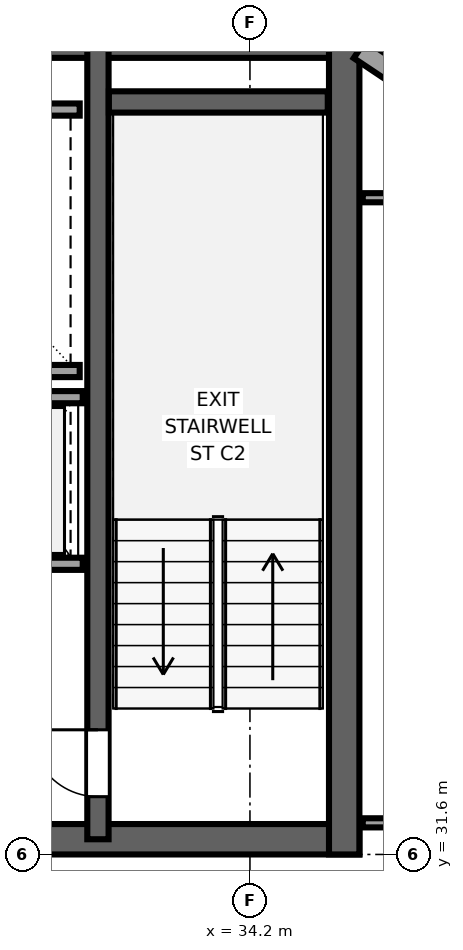
"""IFC4 building model, lengths in metres.
Left out: names, types, materials, properties, quantities, classifications, styles, units other than length and angle.
Written with IfcOpenShell. Run it as: python <this file> out.ifc"""

import sys

from ifc_helpers import new_model, si_unit, direction, frame, frame_2d, origin, place, context, subcontext, project, spatial, rectangle, extrude, source, transform, mapped, element, fill, save


model = new_model("IFC4")
c1 = context("Model", 3, precision=1e-05, world=origin(), true_north=direction((0.0, 1.0)))
c2 = subcontext(c1, "Body", "Model", "MODEL_VIEW")
j1 = project(units=[si_unit("LENGTHUNIT", "METRE"), si_unit("PLANEANGLEUNIT", "RADIAN")], contexts=[c1])
p1 = place(None, origin())
s1 = spatial("IfcSite", under=j1, at=p1, CompositionType="ELEMENT")
p2 = place(p1, origin())
s2 = spatial("IfcBuilding", under=s1, at=p2, CompositionType="ELEMENT")
p3 = place(p2, frame((0.0, 0.0, 245.2)))
s3 = spatial("IfcBuildingStorey", under=s2, at=p3, CompositionType="ELEMENT", Elevation=245.2)
p4 = place(p3, frame((10.0, 31.85, 0.0), z_axis=(0.0, 0.0, 1.0), x_axis=(1.0, 0.0, 0.0)))
e1 = element("IfcWall", 1, at=p4, inside=s3, PredefinedType="SHEAR", context=c2, shape_type="SweptSolid", body=[
    extrude(rectangle(XDim=26.0, YDim=0.5, at=frame_2d((13.0, 0.0))), origin(), (0.0, 0.0, 1.0), 3.55),
])
p5 = place(p4, frame((7.45, 0.0, 0.0), z_axis=(0.0, 0.0, 1.0), x_axis=(-1.0, 0.0, 0.0)))
e2 = element("IfcOpeningElement", 2, at=p5, cuts=e1, PredefinedType="OPENING", context=c2, shape_type="SweptSolid", body=[
    extrude(rectangle(XDim=1.5, YDim=2.04, at=frame_2d((0.75, 1.02))), frame((0.0, 0.26, 0.0), z_axis=(0.0, -1.0, 0.0), x_axis=(1.0, 0.0, 0.0)), (0.0, 0.0, 1.0), 0.52),
])
p6 = place(p4, frame((13.75, 0.0, 0.0), z_axis=(0.0, 0.0, 1.0), x_axis=(-1.0, 0.0, 0.0)))
e3 = element("IfcOpeningElement", 3, at=p6, cuts=e1, PredefinedType="OPENING", context=c2, shape_type="SweptSolid", body=[
    extrude(rectangle(XDim=1.5, YDim=2.04, at=frame_2d((0.75, 1.02))), frame((0.0, 0.26, 0.0), z_axis=(0.0, -1.0, 0.0), x_axis=(1.0, 0.0, 0.0)), (0.0, 0.0, 1.0), 0.52),
])
p7 = place(p4, frame((20.05, 0.0, 0.0), z_axis=(0.0, 0.0, 1.0), x_axis=(-1.0, 0.0, 0.0)))
e4 = element("IfcOpeningElement", 4, at=p7, cuts=e1, PredefinedType="OPENING", context=c2, shape_type="SweptSolid", body=[
    extrude(rectangle(XDim=1.5, YDim=2.04, at=frame_2d((0.75, 1.02))), frame((0.0, 0.26, 0.0), z_axis=(0.0, -1.0, 0.0), x_axis=(1.0, 0.0, 0.0)), (0.0, 0.0, 1.0), 0.52),
])
p8 = place(p3, frame((10.0, 44.95, 0.0), z_axis=(0.0, 0.0, 1.0), x_axis=(1.0, 0.0, 0.0)))
e5 = element("IfcWall", 5, at=p8, inside=s3, PredefinedType="SHEAR", context=c2, shape_type="SweptSolid", body=[
    extrude(rectangle(XDim=26.0, YDim=0.5, at=frame_2d((13.0, 0.0))), origin(), (0.0, 0.0, 1.0), 3.55),
])
p9 = place(p3, frame((35.75, 31.6, 0.0), z_axis=(0.0, 0.0, 1.0), x_axis=(0.0, 1.0, 0.0)))
e6 = element("IfcWall", 6, at=p9, inside=s3, PredefinedType="SHEAR", context=c2, shape_type="SweptSolid", body=[
    extrude(rectangle(XDim=13.6, YDim=0.5, at=frame_2d((6.8, 0.0))), origin(), (0.0, 0.0, 1.0), 3.55),
])
p10 = place(p3, frame((31.7, 31.85, 0.0), z_axis=(0.0, 0.0, 1.0), x_axis=(0.0, 1.0, 0.0)))
e7 = element("IfcWall", 7, at=p10, inside=s3, PredefinedType="SHEAR", context=c2, shape_type="SweptSolid", body=[
    extrude(rectangle(XDim=13.1, YDim=0.35, at=frame_2d((6.55, 0.0))), origin(), (0.0, 0.0, 1.0), 3.55),
])
p11 = place(p10, frame((1.8, 0.0, 0.0), z_axis=(0.0, 0.0, 1.0), x_axis=(-1.0, 0.0, 0.0)))
e8 = element("IfcOpeningElement", 8, at=p11, cuts=e7, PredefinedType="OPENING", context=c2, shape_type="SweptSolid", body=[
    extrude(rectangle(XDim=1.1, YDim=2.12, at=frame_2d((0.55, 1.06))), frame((0.0, 0.185, 0.0), z_axis=(0.0, -1.0, 0.0), x_axis=(1.0, 0.0, 0.0)), (0.0, 0.0, 1.0), 0.37),
])
p12 = place(p3, frame((31.88, 43.975, 0.0), z_axis=(0.0, 0.0, 1.0), x_axis=(1.0, 0.0, 0.0)))
e9 = element("IfcWall", 9, at=p12, inside=s3, PredefinedType="SHEAR", context=c2, shape_type="SweptSolid", body=[
    extrude(rectangle(XDim=3.6, YDim=0.35, at=frame_2d((1.8, 0.0))), origin(), (0.0, 0.0, 1.0), 3.55),
])
p13 = place(p3, frame((37.585, 43.785, 0.0), z_axis=(0.0, 0.0, 1.0), x_axis=(-0.831516639465, 0.555499845448, 0.0)))
e10 = element("IfcWall", 10, at=p13, inside=s3, PredefinedType="SOLIDWALL", context=c2, shape_type="SweptSolid", body=[
    extrude(rectangle(XDim=1.902, YDim=0.35, at=frame_2d((0.951, 0.0))), origin(), (0.0, 0.0, 1.0), 3.37),
])
for number, where, z_axis, x_axis in (
    (11, (27.3, 39.55, 0.0), (0.0, 0.0, 1.0), (1.0, 0.0, 0.0)),
    (12, (27.3, 43.85, 0.0), (0.0, 0.0, 1.0), (1.0, 0.0, 0.0)),
):
    element("IfcWall", number, at=place(p3, frame(where, z_axis=z_axis, x_axis=x_axis)), inside=s3, PredefinedType="SOLIDWALL", context=c2, shape_type="SweptSolid", body=[
        extrude(rectangle(XDim=4.1, YDim=0.2, at=frame_2d((2.05, 0.0))), origin(), (0.0, 0.0, 1.0), 3.37),
    ])
p14 = place(p3, frame((27.375, 36.38, 0.0), z_axis=(0.0, 0.0, 1.0), x_axis=(1.0, 0.0, 0.0)))
e13 = element("IfcWall", 13, at=p14, inside=s3, PredefinedType="SOLIDWALL", context=c2, shape_type="SweptSolid", body=[
    extrude(rectangle(XDim=4.075, YDim=0.2, at=frame_2d((2.038, 0.0))), origin(), (0.0, 0.0, 1.0), 3.37),
])
p15 = place(p14, frame((0.525, 0.0, 0.0)))
e14 = element("IfcOpeningElement", 14, at=p15, cuts=e13, PredefinedType="OPENING", context=c2, shape_type="SweptSolid", body=[
    extrude(rectangle(XDim=1.1, YDim=2.12, at=frame_2d((0.55, 1.06))), frame((0.0, 0.11, 0.0), z_axis=(0.0, -1.0, 0.0), x_axis=(1.0, 0.0, 0.0)), (0.0, 0.0, 1.0), 0.22),
])
p16 = place(p14, frame((2.425, 0.0, 0.0)))
e15 = element("IfcOpeningElement", 15, at=p16, cuts=e13, PredefinedType="OPENING", context=c2, shape_type="SweptSolid", body=[
    extrude(rectangle(XDim=1.1, YDim=2.12, at=frame_2d((0.55, 1.06))), frame((0.0, 0.11, 0.0), z_axis=(0.0, -1.0, 0.0), x_axis=(1.0, 0.0, 0.0)), (0.0, 0.0, 1.0), 0.22),
])
p17 = place(p3, frame((27.375, 39.12, 0.0), z_axis=(0.0, 0.0, 1.0), x_axis=(1.0, 0.0, 0.0)))
e16 = element("IfcWall", 16, at=p17, inside=s3, PredefinedType="SOLIDWALL", context=c2, shape_type="SweptSolid", body=[
    extrude(rectangle(XDim=4.075, YDim=0.2, at=frame_2d((2.038, 0.0))), origin(), (0.0, 0.0, 1.0), 3.37),
])
p18 = place(p3, frame((36.055, 32.12, 0.0), z_axis=(0.0, 0.0, 1.0), x_axis=(1.0, 0.0, 0.0)))
e17 = element("IfcWall", 17, at=p18, inside=s3, PredefinedType="PARTITIONING", context=c2, shape_type="SweptSolid", body=[
    extrude(rectangle(XDim=2.54, YDim=0.15, at=frame_2d((1.27, 0.0))), origin(), (0.0, 0.0, 1.0), 3.37),
])
p19 = place(p18, frame((0.76, 0.0, 0.0)))
e18 = element("IfcOpeningElement", 18, at=p19, cuts=e17, PredefinedType="OPENING", context=c2, shape_type="SweptSolid", body=[
    extrude(rectangle(XDim=1.02, YDim=2.03, at=frame_2d((0.51, 1.015))), frame((0.0, 0.085, 0.0), z_axis=(0.0, -1.0, 0.0), x_axis=(1.0, 0.0, 0.0)), (0.0, 0.0, 1.0), 0.17),
])
p20 = place(p3, frame((36.055, 42.4, 0.0), z_axis=(0.0, 0.0, 1.0), x_axis=(1.0, 0.0, 0.0)))
e19 = element("IfcWall", 19, at=p20, inside=s3, PredefinedType="PARTITIONING", context=c2, shape_type="SweptSolid", body=[
    extrude(rectangle(XDim=2.179, YDim=0.15, at=frame_2d((1.089, 0.0))), origin(), (0.0, 0.0, 1.0), 3.37),
])
m1 = source(origin(), c2, "Body", "SweptSolid", [
    extrude(rectangle(XDim=1.1, YDim=2.12, at=frame_2d((0.55, 1.06))), frame((0.0, 0.025, 0.0), z_axis=(0.0, -1.0, 0.0), x_axis=(1.0, 0.0, 0.0)), (0.0, 0.0, 1.0), 0.05),
])
p21 = place(p11, origin())
e20 = element("IfcDoor", 20, at=p21, inside=s3, OperationType="SINGLE_SWING_RIGHT", PredefinedType="DOOR", context=c2, shape_type="MappedRepresentation", body=[
    mapped(m1, transform((0.0, 0.0, 0.0), x_axis=(1.0, 0.0, 0.0), y_axis=(0.0, 1.0, 0.0), z_axis=(0.0, 0.0, 1.0), scale=1.0)),
])
fill(e8, e20)
save(model, sys.argv[1])
